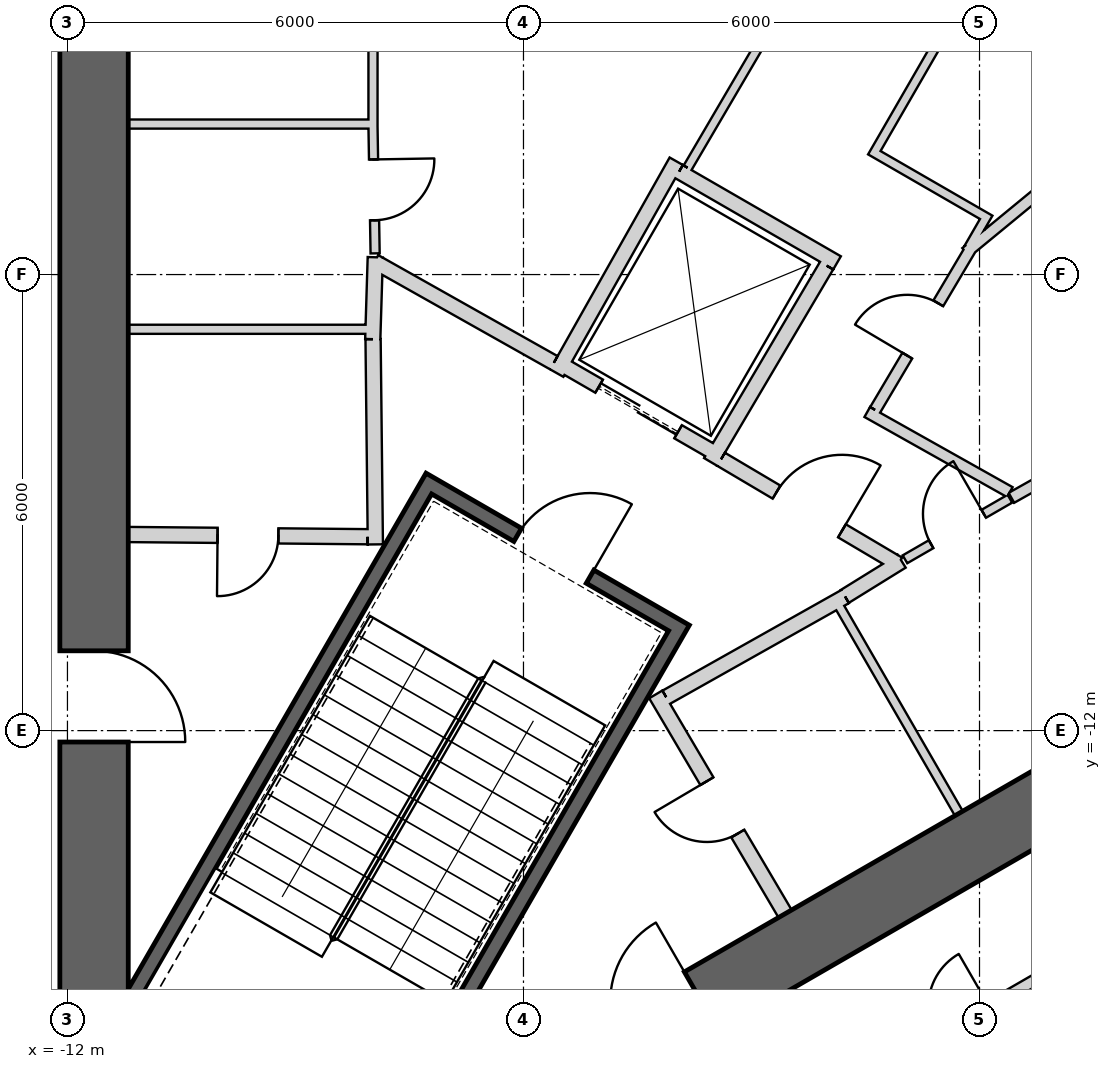
"""IFC4 building model, lengths in metres.
Left out: names, types, materials, properties, quantities, classifications, styles, units other than length and angle.
Written with IfcOpenShell. Run it as: python <this file> out.ifc"""

import sys

from ifc_helpers import new_model, si_unit, direction, frame, frame_2d, origin, place, context, subcontext, project, spatial, rectangle, extrude, element, fill, save


model = new_model("IFC4")
c1 = context("Model", 3, precision=1e-05, world=origin(), true_north=direction((0.0, 1.0)))
c2 = subcontext(c1, "Body", "Model", "MODEL_VIEW")
j1 = project(units=[si_unit("LENGTHUNIT", "METRE"), si_unit("PLANEANGLEUNIT", "RADIAN")], contexts=[c1])
p1 = place(None, origin())
s1 = spatial("IfcSite", under=j1, at=p1, CompositionType="ELEMENT")
p2 = place(p1, origin())
s2 = spatial("IfcBuilding", under=s1, at=p2, CompositionType="ELEMENT")
p3 = place(p2, frame((0.0, 0.0, 430.3)))
s3 = spatial("IfcBuildingStorey", under=s2, at=p3, CompositionType="ELEMENT", Elevation=430.3)
p4 = place(p3, frame((-11.65, 15.762, 0.0), z_axis=(0.0, 0.0, 1.0), x_axis=(0.0, -1.0, 0.0)))
e1 = element("IfcWall", 1, at=p4, inside=s3, PredefinedType="SHEAR", context=c2, shape_type="SweptSolid", body=[
    extrude(rectangle(XDim=31.523, YDim=0.9, at=frame_2d((15.762, 0.0))), origin(), (0.0, 0.0, 1.0), 5.0),
])
p5 = place(p4, frame((3.612, 0.0, 0.0)))
e2 = element("IfcOpeningElement", 2, at=p5, cuts=e1, PredefinedType="OPENING", context=c2, shape_type="SweptSolid", body=[
    extrude(rectangle(XDim=1.2, YDim=2.4, at=frame_2d((0.6, 1.2))), frame((0.0, 0.46, 0.0), z_axis=(0.0, -1.0, 0.0), x_axis=(1.0, 0.0, 0.0)), (0.0, 0.0, 1.0), 0.92),
])
p6 = place(p4, frame((26.712, 0.0, 0.0)))
e3 = element("IfcOpeningElement", 3, at=p6, cuts=e1, PredefinedType="OPENING", context=c2, shape_type="SweptSolid", body=[
    extrude(rectangle(XDim=1.2, YDim=2.4, at=frame_2d((0.6, 1.2))), frame((0.0, 0.46, 0.0), z_axis=(0.0, -1.0, 0.0), x_axis=(1.0, 0.0, 0.0)), (0.0, 0.0, 1.0), 0.92),
])
p7 = place(p3, frame((-7.825, -17.97, 0.0), z_axis=(0.0, 0.0, 1.0), x_axis=(0.866028369851, 0.499994862586, 0.0)))
e4 = element("IfcWall", 4, at=p7, inside=s3, PredefinedType="SHEAR", context=c2, shape_type="SweptSolid", body=[
    extrude(rectangle(XDim=31.523, YDim=0.9, at=frame_2d((15.762, 0.0))), origin(), (0.0, 0.0, 1.0), 5.0),
])
p8 = place(p7, frame((17.862, 0.0, 0.0)))
e5 = element("IfcOpeningElement", 5, at=p8, cuts=e4, PredefinedType="OPENING", context=c2, shape_type="SweptSolid", body=[
    extrude(rectangle(XDim=1.2, YDim=2.4, at=frame_2d((0.6, 1.2))), frame((0.0, 0.46, 0.0), z_axis=(0.0, -1.0, 0.0), x_axis=(1.0, 0.0, 0.0)), (0.0, 0.0, 1.0), 0.92),
])
p9 = place(p7, frame((20.562, 0.0, 0.0)))
e6 = element("IfcOpeningElement", 6, at=p9, cuts=e4, PredefinedType="OPENING", context=c2, shape_type="SweptSolid", body=[
    extrude(rectangle(XDim=1.2, YDim=2.4, at=frame_2d((0.6, 1.2))), frame((0.0, 0.46, 0.0), z_axis=(0.0, -1.0, 0.0), x_axis=(1.0, 0.0, 0.0)), (0.0, 0.0, 1.0), 0.92),
])
p10 = place(p7, frame((26.712, 0.0, 0.0)))
e7 = element("IfcOpeningElement", 7, at=p10, cuts=e4, PredefinedType="OPENING", context=c2, shape_type="SweptSolid", body=[
    extrude(rectangle(XDim=1.2, YDim=2.4, at=frame_2d((0.6, 1.2))), frame((0.0, 0.46, 0.0), z_axis=(0.0, -1.0, 0.0), x_axis=(1.0, 0.0, 0.0)), (0.0, 0.0, 1.0), 0.92),
])
p11 = place(p7, frame((3.612, 0.0, 0.0)))
e8 = element("IfcOpeningElement", 8, at=p11, cuts=e4, PredefinedType="OPENING", context=c2, shape_type="SweptSolid", body=[
    extrude(rectangle(XDim=1.2, YDim=2.4, at=frame_2d((0.6, 1.2))), frame((0.0, 0.46, 0.0), z_axis=(0.0, -1.0, 0.0), x_axis=(1.0, 0.0, 0.0)), (0.0, 0.0, 1.0), 0.92),
])
p12 = place(p3, frame((-3.905, -10.563, -0.25), z_axis=(0.0, 0.0, 1.0), x_axis=(-0.500012932018, -0.866017937352, 0.0)))
e9 = element("IfcWall", 9, at=p12, inside=s3, PredefinedType="SHEAR", context=c2, shape_type="SweptSolid", body=[
    extrude(rectangle(XDim=8.1, YDim=0.2, at=frame_2d((4.05, 0.0))), origin(), (0.0, 0.0, 1.0), 5.0),
])
p13 = place(p3, frame((-7.196, -8.663, -0.25), z_axis=(0.0, 0.0, 1.0), x_axis=(-0.499997992926, -0.866026562566, 0.0)))
e10 = element("IfcWall", 10, at=p13, inside=s3, PredefinedType="SHEAR", context=c2, shape_type="SweptSolid", body=[
    extrude(rectangle(XDim=7.9, YDim=0.2, at=frame_2d((3.95, 0.0))), origin(), (0.0, 0.0, 1.0), 5.0),
])
p14 = place(p3, frame((-4.041, -10.599, -0.25), z_axis=(0.0, 0.0, 1.0), x_axis=(-0.866047807691, 0.499961193289, 0.0)))
e11 = element("IfcWall", 11, at=p14, inside=s3, PredefinedType="SHEAR", context=c2, shape_type="SweptSolid", body=[
    extrude(rectangle(XDim=3.6, YDim=0.2, at=frame_2d((1.8, 0.0))), origin(), (0.0, 0.0, 1.0), 5.0),
])
p15 = place(p14, frame((1.25, 0.0, 0.25)))
e12 = element("IfcOpeningElement", 12, at=p15, cuts=e11, PredefinedType="OPENING", context=c2, shape_type="SweptSolid", body=[
    extrude(rectangle(XDim=1.1, YDim=2.1, at=frame_2d((0.55, 1.05))), frame((0.0, 0.11, 0.0), z_axis=(0.0, -1.0, 0.0), x_axis=(1.0, 0.0, 0.0)), (0.0, 0.0, 1.0), 0.22),
])
p16 = place(p3, frame((-3.446, -8.368, 0.0), z_axis=(0.0, 0.0, 1.0), x_axis=(-0.866024647952, 0.500001309137, 0.0)))
e13 = element("IfcWall", 13, at=p16, inside=s3, PredefinedType="PLUMBINGWALL", context=c2, shape_type="SweptSolid", body=[
    extrude(rectangle(XDim=2.4, YDim=0.2, at=frame_2d((1.2, 0.0))), origin(), (0.0, 0.0, 1.0), 4.75),
])
p17 = place(p16, frame((0.6, 0.0, 0.0)))
e14 = element("IfcOpeningElement", 14, at=p17, cuts=e13, PredefinedType="OPENING", context=c2, shape_type="SweptSolid", body=[
    extrude(rectangle(XDim=1.2, YDim=2.4, at=frame_2d((0.6, 1.2))), frame((0.0, 0.11, 0.0), z_axis=(0.0, -1.0, 0.0), x_axis=(1.0, 0.0, 0.0)), (0.0, 0.0, 1.0), 0.22),
])
p18 = place(p3, frame((-5.562, -7.296, 0.0), z_axis=(0.0, 0.0, 1.0), x_axis=(0.491358283181, 0.870957540612, 0.0)))
e15 = element("IfcWall", 15, at=p18, inside=s3, PredefinedType="PLUMBINGWALL", context=c2, shape_type="SweptSolid", body=[
    extrude(rectangle(XDim=3.2, YDim=0.2, at=frame_2d((1.6, 0.0))), origin(), (0.0, 0.0, 1.0), 4.75),
])
p19 = place(p3, frame((-3.953, -4.646, 0.0), z_axis=(0.0, 0.0, 1.0), x_axis=(0.866024647952, -0.500001309137, 0.0)))
e16 = element("IfcWall", 16, at=p19, inside=s3, PredefinedType="PLUMBINGWALL", context=c2, shape_type="SweptSolid", body=[
    extrude(rectangle(XDim=2.4, YDim=0.2, at=frame_2d((1.2, 0.0))), origin(), (0.0, 0.0, 1.0), 4.75),
])
p20 = place(p3, frame((-2.012, -5.882, 0.0), z_axis=(0.0, 0.0, 1.0), x_axis=(-0.508619639323, -0.860991325447, 0.0)))
e17 = element("IfcWall", 17, at=p20, inside=s3, PredefinedType="PLUMBINGWALL", context=c2, shape_type="SweptSolid", body=[
    extrude(rectangle(XDim=3.0, YDim=0.2, at=frame_2d((1.5, 0.0))), origin(), (0.0, 0.0, 1.0), 4.75),
])
p21 = place(p3, frame((-11.2, -4.02, 0.0), z_axis=(0.0, 0.0, 1.0), x_axis=(1.0, 0.0, 0.0)))
e18 = element("IfcWall", 18, at=p21, inside=s3, PredefinedType="PARTITIONING", context=c2, shape_type="SweptSolid", body=[
    extrude(rectangle(XDim=3.25, YDim=0.12, at=frame_2d((1.625, 0.0))), origin(), (0.0, 0.0, 1.0), 4.75),
])
p22 = place(p3, frame((-7.98, 4.05, 0.0), z_axis=(0.0, 0.0, 1.0), x_axis=(0.0, -1.0, 0.0)))
e19 = element("IfcWall", 19, at=p22, inside=s3, PredefinedType="PARTITIONING", context=c2, shape_type="SweptSolid", body=[
    extrude(rectangle(XDim=8.1, YDim=0.12, at=frame_2d((4.05, 0.0))), origin(), (0.0, 0.0, 1.0), 4.75),
])
p23 = place(p22, frame((3.65, 0.0, 0.0)))
e20 = element("IfcOpeningElement", 20, at=p23, cuts=e19, PredefinedType="OPENING", context=c2, shape_type="SweptSolid", body=[
    extrude(rectangle(XDim=0.8, YDim=2.1, at=frame_2d((0.4, 1.05))), frame((0.0, 0.07, 0.0), z_axis=(0.0, -1.0, 0.0), x_axis=(1.0, 0.0, 0.0)), (0.0, 0.0, 1.0), 0.14),
])
p24 = place(p3, frame((-11.2, -6.72, 0.0), z_axis=(0.0, 0.0, 1.0), x_axis=(1.0, 0.0, 0.0)))
e21 = element("IfcWall", 21, at=p24, inside=s3, PredefinedType="PARTITIONING", context=c2, shape_type="SweptSolid", body=[
    extrude(rectangle(XDim=3.25, YDim=0.12, at=frame_2d((1.625, 0.0))), origin(), (0.0, 0.0, 1.0), 4.75),
])
p25 = place(p3, frame((-7.983, -6.85, 0.0), z_axis=(0.0, 0.0, 1.0), x_axis=(0.030803413295, 0.999525462272, 0.0)))
e22 = element("IfcWall", 22, at=p25, inside=s3, PredefinedType="PARTITIONING", context=c2, shape_type="SweptSolid", body=[
    extrude(rectangle(XDim=1.078, YDim=0.2, at=frame_2d((0.539, 0.0))), origin(), (0.0, 0.0, 1.0), 4.75),
])
p26 = place(p3, frame((-7.98, -4.05, 0.0), z_axis=(0.0, 0.0, 1.0), x_axis=(0.016798213807, -0.999858900052, 0.0)))
e23 = element("IfcWall", 23, at=p26, inside=s3, PredefinedType="PARTITIONING", context=c2, shape_type="SweptSolid", body=[
    extrude(rectangle(XDim=1.671, YDim=0.12, at=frame_2d((0.836, 0.0))), origin(), (0.0, 0.0, 1.0), 4.75),
])
p27 = place(p26, frame((0.436, 0.0, 0.0)))
e24 = element("IfcOpeningElement", 24, at=p27, cuts=e23, PredefinedType="OPENING", context=c2, shape_type="SweptSolid", body=[
    extrude(rectangle(XDim=0.8, YDim=2.1, at=frame_2d((0.4, 1.05))), frame((0.0, 0.07, 0.0), z_axis=(0.0, -1.0, 0.0), x_axis=(1.0, 0.0, 0.0)), (0.0, 0.0, 1.0), 0.14),
])
p28 = place(p3, frame((-7.949, -9.55, 0.0), z_axis=(0.0, 0.0, 1.0), x_axis=(-0.011121475088, 0.999938154483, 0.0)))
e25 = element("IfcWall", 25, at=p28, inside=s3, PredefinedType="PARTITIONING", context=c2, shape_type="SweptSolid", body=[
    extrude(rectangle(XDim=2.7, YDim=0.2, at=frame_2d((1.35, 0.0))), origin(), (0.0, 0.0, 1.0), 4.75),
])
p29 = place(p3, frame((-11.2, -9.42, 0.0), z_axis=(0.0, 0.0, 1.0), x_axis=(0.999957467379, -0.009222983926, 0.0)))
e26 = element("IfcWall", 26, at=p29, inside=s3, PredefinedType="PARTITIONING", context=c2, shape_type="SweptSolid", body=[
    extrude(rectangle(XDim=3.15, YDim=0.2, at=frame_2d((1.575, 0.0))), origin(), (0.0, 0.0, 1.0), 4.75),
])
p30 = place(p29, frame((1.175, 0.0, 0.0)))
e27 = element("IfcOpeningElement", 27, at=p30, cuts=e26, PredefinedType="OPENING", context=c2, shape_type="SweptSolid", body=[
    extrude(rectangle(XDim=0.8, YDim=2.1, at=frame_2d((0.4, 1.05))), frame((0.0, 0.11, 0.0), z_axis=(0.0, -1.0, 0.0), x_axis=(1.0, 0.0, 0.0)), (0.0, 0.0, 1.0), 0.22),
])
p31 = place(p3, frame((-1.897, -10.275, 0.0), z_axis=(0.0, 0.0, 1.0), x_axis=(0.499984717929, -0.866034226713, 0.0)))
e28 = element("IfcWall", 28, at=p31, inside=s3, PredefinedType="PARTITIONING", context=c2, shape_type="SweptSolid", body=[
    extrude(rectangle(XDim=3.25, YDim=0.12, at=frame_2d((1.625, 0.0))), origin(), (0.0, 0.0, 1.0), 4.75),
])
p32 = place(p3, frame((-4.26, -11.524, 0.0), z_axis=(0.0, 0.0, 1.0), x_axis=(0.507997497166, -0.861358544901, 0.0)))
e29 = element("IfcWall", 29, at=p32, inside=s3, PredefinedType="PARTITIONING", context=c2, shape_type="SweptSolid", body=[
    extrude(rectangle(XDim=3.35, YDim=0.2, at=frame_2d((1.675, 0.0))), origin(), (0.0, 0.0, 1.0), 4.75),
])
p33 = place(p32, frame((1.325, 0.0, 0.0)))
e30 = element("IfcOpeningElement", 30, at=p33, cuts=e29, PredefinedType="OPENING", context=c2, shape_type="SweptSolid", body=[
    extrude(rectangle(XDim=0.8, YDim=2.1, at=frame_2d((0.4, 1.05))), frame((0.0, 0.11, 0.0), z_axis=(0.0, -1.0, 0.0), x_axis=(1.0, 0.0, 0.0)), (0.0, 0.0, 1.0), 0.22),
])
p34 = place(p3, frame((-1.769, -10.237, 0.0), z_axis=(0.0, 0.0, 1.0), x_axis=(-0.871534483978, -0.490334215854, 0.0)))
e31 = element("IfcWall", 31, at=p34, inside=s3, PredefinedType="PARTITIONING", context=c2, shape_type="SweptSolid", body=[
    extrude(rectangle(XDim=2.7, YDim=0.2, at=frame_2d((1.35, 0.0))), origin(), (0.0, 0.0, 1.0), 4.75),
])
p35 = place(p3, frame((-1.024, -9.771, 0.0), z_axis=(0.0, 0.0, 1.0), x_axis=(-0.850348075135, -0.526220629693, 0.0)))
e32 = element("IfcWall", 32, at=p35, inside=s3, PredefinedType="PARTITIONING", context=c2, shape_type="SweptSolid", body=[
    extrude(rectangle(XDim=0.878, YDim=0.2, at=frame_2d((0.439, 0.0))), origin(), (0.0, 0.0, 1.0), 4.75),
])
p36 = place(p3, frame((0.42, -8.938, 0.0), z_axis=(0.0, 0.0, 1.0), x_axis=(0.871409832999, 0.490555708306, 0.0)))
e33 = element("IfcWall", 33, at=p36, inside=s3, PredefinedType="PLUMBINGWALL", context=c2, shape_type="SweptSolid", body=[
    extrude(rectangle(XDim=2.755, YDim=0.15, at=frame_2d((1.377, 0.0))), origin(), (0.0, 0.0, 1.0), 4.75),
])
p37 = place(p3, frame((0.4, -8.949, 0.0), z_axis=(0.0, 0.0, 1.0), x_axis=(-0.866019818373, -0.500009674092, 0.0)))
e34 = element("IfcWall", 34, at=p37, inside=s3, PredefinedType="PARTITIONING", context=c2, shape_type="SweptSolid", body=[
    extrude(rectangle(XDim=1.594, YDim=0.12, at=frame_2d((0.797, 0.0))), origin(), (0.0, 0.0, 1.0), 4.75),
])
p38 = place(p37, frame((0.397, 0.0, 0.0)))
e35 = element("IfcOpeningElement", 35, at=p38, cuts=e34, PredefinedType="OPENING", context=c2, shape_type="SweptSolid", body=[
    extrude(rectangle(XDim=0.8, YDim=2.1, at=frame_2d((0.4, 1.05))), frame((0.0, 0.07, 0.0), z_axis=(0.0, -1.0, 0.0), x_axis=(1.0, 0.0, 0.0)), (0.0, 0.0, 1.0), 0.14),
])
p39 = place(p3, frame((-7.959, -5.832, 0.0), z_axis=(0.0, 0.0, 1.0), x_axis=(0.871322567751, -0.490710691679, 0.0)))
e36 = element("IfcWall", 36, at=p39, inside=s3, PredefinedType="PARTITIONING", context=c2, shape_type="SweptSolid", body=[
    extrude(rectangle(XDim=2.708, YDim=0.2, at=frame_2d((1.354, 0.0))), origin(), (0.0, 0.0, 1.0), 4.75),
])
p40 = place(p3, frame((-3.401, -8.43, 0.0), z_axis=(0.0, 0.0, 1.0), x_axis=(0.860617791406, -0.509251428192, 0.0)))
e37 = element("IfcWall", 37, at=p40, inside=s3, PredefinedType="PARTITIONING", context=c2, shape_type="SweptSolid", body=[
    extrude(rectangle(XDim=2.709, YDim=0.2, at=frame_2d((1.354, 0.0))), origin(), (0.0, 0.0, 1.0), 4.75),
])
p41 = place(p40, frame((0.848, 0.0, 0.0)))
e38 = element("IfcOpeningElement", 38, at=p41, cuts=e37, PredefinedType="OPENING", context=c2, shape_type="SweptSolid", body=[
    extrude(rectangle(XDim=1.0, YDim=2.1, at=frame_2d((0.5, 1.05))), frame((0.0, 0.11, 0.0), z_axis=(0.0, -1.0, 0.0), x_axis=(1.0, 0.0, 0.0)), (0.0, 0.0, 1.0), 0.22),
])
p42 = place(p3, frame((-3.841, -4.595, 0.0), z_axis=(0.0, 0.0, 1.0), x_axis=(0.505883680705, 0.862601705074, 0.0)))
e39 = element("IfcWall", 39, at=p42, inside=s3, PredefinedType="PARTITIONING", context=c2, shape_type="SweptSolid", body=[
    extrude(rectangle(XDim=4.236, YDim=0.12, at=frame_2d((2.118, 0.0))), origin(), (0.0, 0.0, 1.0), 4.75),
])
p43 = place(p3, frame((5.548, -1.0, 0.0), z_axis=(0.0, 0.0, 1.0), x_axis=(-0.772345431507, -0.635202750648, 0.0)))
e40 = element("IfcWall", 40, at=p43, inside=s3, PredefinedType="PLUMBINGWALL", context=c2, shape_type="SweptSolid", body=[
    extrude(rectangle(XDim=7.415, YDim=0.15, at=frame_2d((3.707, 0.0))), origin(), (0.0, 0.0, 1.0), 4.75),
])
p44 = place(p3, frame((-1.477, -7.808, 0.0), z_axis=(0.0, 0.0, 1.0), x_axis=(0.871829948107, -0.48980867855, 0.0)))
e41 = element("IfcWall", 41, at=p44, inside=s3, PredefinedType="PLUMBINGWALL", context=c2, shape_type="SweptSolid", body=[
    extrude(rectangle(XDim=2.152, YDim=0.15, at=frame_2d((1.076, 0.0))), origin(), (0.0, 0.0, 1.0), 4.75),
])
p45 = place(p3, frame((-0.119, -5.664, 0.0), z_axis=(0.0, 0.0, 1.0), x_axis=(-0.509935662771, -0.860212543406, 0.0)))
e42 = element("IfcWall", 42, at=p45, inside=s3, PredefinedType="PLUMBINGWALL", context=c2, shape_type="SweptSolid", body=[
    extrude(rectangle(XDim=2.46, YDim=0.15, at=frame_2d((1.23, 0.0))), origin(), (0.0, 0.0, 1.0), 4.75),
])
p46 = place(p45, frame((0.83, 0.0, 0.0)))
e43 = element("IfcOpeningElement", 43, at=p46, cuts=e42, PredefinedType="OPENING", context=c2, shape_type="SweptSolid", body=[
    extrude(rectangle(XDim=0.8, YDim=2.1, at=frame_2d((0.4, 1.05))), frame((0.0, 0.085, 0.0), z_axis=(0.0, -1.0, 0.0), x_axis=(1.0, 0.0, 0.0)), (0.0, 0.0, 1.0), 0.17),
])
p47 = place(p3, frame((-0.144, -5.649, 0.0), z_axis=(0.0, 0.0, 1.0), x_axis=(0.499843319224, 0.866115844577, 0.0)))
e44 = element("IfcWall", 44, at=p47, inside=s3, PredefinedType="PARTITIONING", context=c2, shape_type="SweptSolid", body=[
    extrude(rectangle(XDim=0.525, YDim=0.12, at=frame_2d((0.262, 0.0))), origin(), (0.0, 0.0, 1.0), 4.75),
])
p48 = place(p3, frame((-1.436, -4.367, 0.0), z_axis=(0.0, 0.0, 1.0), x_axis=(0.866087547558, -0.499892348375, 0.0)))
e45 = element("IfcWall", 45, at=p48, inside=s3, PredefinedType="PARTITIONING", context=c2, shape_type="SweptSolid", body=[
    extrude(rectangle(XDim=1.7, YDim=0.12, at=frame_2d((0.85, 0.0))), origin(), (0.0, 0.0, 1.0), 4.75),
])
p49 = place(p3, frame((0.095, -1.835, 0.0), z_axis=(0.0, 0.0, 1.0), x_axis=(-0.499980071345, -0.866036909293, 0.0)))
e46 = element("IfcWall", 46, at=p49, inside=s3, PredefinedType="PARTITIONING", context=c2, shape_type="SweptSolid", body=[
    extrude(rectangle(XDim=2.898, YDim=0.12, at=frame_2d((1.449, 0.0))), origin(), (0.0, 0.0, 1.0), 4.75),
])
p50 = place(p3, frame((-7.213, -19.868, 0.0), z_axis=(0.0, 0.0, 1.0), x_axis=(0.866028156973, 0.499995231308, 0.0)))
e47 = element("IfcWall", 47, at=p50, inside=s3, PredefinedType="PLUMBINGWALL", context=c2, shape_type="SweptSolid", body=[
    extrude(rectangle(XDim=16.063, YDim=0.15, at=frame_2d((8.032, 0.0))), origin(), (0.0, 0.0, 1.0), 4.75),
])
p51 = place(p50, frame((7.675, 0.0, 0.0)))
e48 = element("IfcOpeningElement", 48, at=p51, cuts=e47, PredefinedType="OPENING", context=c2, shape_type="SweptSolid", body=[
    extrude(rectangle(XDim=0.8, YDim=2.1, at=frame_2d((0.4, 1.05))), frame((0.0, 0.085, 0.0), z_axis=(0.0, -1.0, 0.0), x_axis=(1.0, 0.0, 0.0)), (0.0, 0.0, 1.0), 0.17),
])
p52 = place(p15, origin())
e49 = element("IfcDoor", 49, at=p52, inside=s3, OperationType="SINGLE_SWING_LEFT", PredefinedType="USERDEFINED", context=c2, shape_type="SweptSolid", body=[
    extrude(rectangle(XDim=1.1, YDim=2.1, at=frame_2d((0.55, 1.05))), frame((0.0, 0.025, 0.0), z_axis=(0.0, -1.0, 0.0), x_axis=(1.0, 0.0, 0.0)), (0.0, 0.0, 1.0), 0.05),
])
fill(e12, e49)
p53 = place(p41, origin())
e50 = element("IfcDoor", 50, at=p53, inside=s3, OperationType="SINGLE_SWING_RIGHT", PredefinedType="USERDEFINED", context=c2, shape_type="SweptSolid", body=[
    extrude(rectangle(XDim=1.0, YDim=2.1, at=frame_2d((0.5, 1.05))), frame((0.0, 0.025, 0.0), z_axis=(0.0, -1.0, 0.0), x_axis=(1.0, 0.0, 0.0)), (0.0, 0.0, 1.0), 0.05),
])
fill(e38, e50)
p54 = place(p17, origin())
e51 = element("IfcDoor", 51, at=p54, inside=s3, OperationType="SLIDING_TO_LEFT", PredefinedType="USERDEFINED", context=c2, shape_type="SweptSolid", body=[
    extrude(rectangle(XDim=1.2, YDim=2.4, at=frame_2d((0.6, 1.2))), frame((0.0, 0.025, 0.0), z_axis=(0.0, -1.0, 0.0), x_axis=(1.0, 0.0, 0.0)), (0.0, 0.0, 1.0), 0.05),
])
fill(e14, e51)
p55 = place(p46, origin())
e52 = element("IfcDoor", 52, at=p55, inside=s3, OperationType="SINGLE_SWING_RIGHT", PredefinedType="USERDEFINED", context=c2, shape_type="SweptSolid", body=[
    extrude(rectangle(XDim=0.8, YDim=2.1, at=frame_2d((0.4, 1.05))), frame((0.0, 0.025, 0.0), z_axis=(0.0, -1.0, 0.0), x_axis=(1.0, 0.0, 0.0)), (0.0, 0.0, 1.0), 0.05),
])
fill(e43, e52)
p56 = place(p27, origin())
e53 = element("IfcDoor", 53, at=p56, inside=s3, OperationType="SINGLE_SWING_LEFT", PredefinedType="USERDEFINED", context=c2, shape_type="SweptSolid", body=[
    extrude(rectangle(XDim=0.8, YDim=2.1, at=frame_2d((0.4, 1.05))), frame((0.0, 0.025, 0.0), z_axis=(0.0, -1.0, 0.0), x_axis=(1.0, 0.0, 0.0)), (0.0, 0.0, 1.0), 0.05),
])
fill(e24, e53)
p57 = place(p30, origin())
e54 = element("IfcDoor", 54, at=p57, inside=s3, OperationType="SINGLE_SWING_LEFT", PredefinedType="USERDEFINED", context=c2, shape_type="SweptSolid", body=[
    extrude(rectangle(XDim=0.8, YDim=2.1, at=frame_2d((0.4, 1.05))), frame((0.0, 0.025, 0.0), z_axis=(0.0, -1.0, 0.0), x_axis=(1.0, 0.0, 0.0)), (0.0, 0.0, 1.0), 0.05),
])
fill(e27, e54)
p58 = place(p33, origin())
e55 = element("IfcDoor", 55, at=p58, inside=s3, OperationType="SINGLE_SWING_LEFT", PredefinedType="USERDEFINED", context=c2, shape_type="SweptSolid", body=[
    extrude(rectangle(XDim=0.8, YDim=2.1, at=frame_2d((0.4, 1.05))), frame((0.0, 0.025, 0.0), z_axis=(0.0, -1.0, 0.0), x_axis=(1.0, 0.0, 0.0)), (0.0, 0.0, 1.0), 0.05),
])
fill(e30, e55)
p59 = place(p38, origin())
e56 = element("IfcDoor", 56, at=p59, inside=s3, OperationType="SINGLE_SWING_LEFT", PredefinedType="USERDEFINED", context=c2, shape_type="SweptSolid", body=[
    extrude(rectangle(XDim=0.8, YDim=2.1, at=frame_2d((0.4, 1.05))), frame((0.0, 0.025, 0.0), z_axis=(0.0, -1.0, 0.0), x_axis=(1.0, 0.0, 0.0)), (0.0, 0.0, 1.0), 0.05),
])
fill(e35, e56)
p60 = place(p6, origin())
e57 = element("IfcDoor", 57, at=p60, inside=s3, OperationType="SINGLE_SWING_RIGHT", PredefinedType="USERDEFINED", context=c2, shape_type="SweptSolid", body=[
    extrude(rectangle(XDim=1.2, YDim=2.4, at=frame_2d((0.6, 1.2))), frame((0.0, 0.025, 0.0), z_axis=(0.0, -1.0, 0.0), x_axis=(1.0, 0.0, 0.0)), (0.0, 0.0, 1.0), 0.05),
])
fill(e3, e57)
save(model, sys.argv[1])
